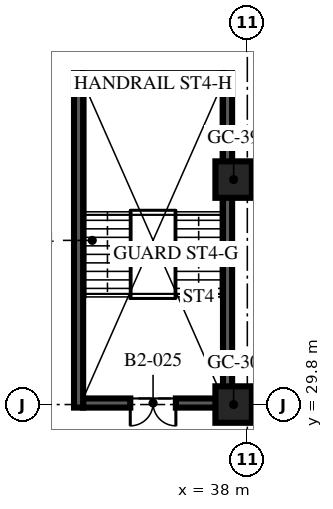
"""IFC4 building model, lengths in metres.
Left out: names, types, materials, properties, quantities, classifications, styles, units other than length and angle.
Written with IfcOpenShell. Run it as: python <this file> out.ifc"""

import sys

from ifc_helpers import new_model, si_unit, direction, frame, frame_2d, origin, origin_2d, place, context, subcontext, project, spatial, rectangle, extrude, element, fill, save


model = new_model("IFC4")
c1 = context("Model", 3, precision=1e-05, world=origin(), true_north=direction((0.0, 1.0)))
c2 = subcontext(c1, "Body", "Model", "MODEL_VIEW")
j1 = project(units=[si_unit("LENGTHUNIT", "METRE"), si_unit("PLANEANGLEUNIT", "RADIAN")], contexts=[c1])
p1 = place(None, origin())
s1 = spatial("IfcSite", under=j1, at=p1, CompositionType="ELEMENT")
p2 = place(p1, origin())
s2 = spatial("IfcBuilding", under=s1, at=p2, CompositionType="ELEMENT")
p3 = place(p2, frame((0.0, 0.0, -9.0)))
s3 = spatial("IfcBuildingStorey", under=s2, at=p3, CompositionType="ELEMENT", Elevation=-9.0)
for number, where, z_axis, x_axis in (
    (1, (37.55, 29.8, 0.0), (0.0, 0.0, 1.0), (1.0, 0.0, 0.0)),
    (2, (37.55, 37.2, 0.0), (0.0, 0.0, 1.0), (1.0, 0.0, 0.0)),
):
    element("IfcColumn", number, at=place(p3, frame(where, z_axis=z_axis, x_axis=x_axis)), inside=s3, PredefinedType="COLUMN", context=c2, shape_type="SweptSolid", body=[
        extrude(rectangle(XDim=1.2, YDim=1.2, at=origin_2d()), origin(), (0.0, 0.0, 1.0), 3.6),
    ])
p4 = place(p3, frame((37.35, 29.7, 0.0), z_axis=(0.0, 0.0, 1.0), x_axis=(0.0, 1.0, 0.0)))
e3 = element("IfcWall", 3, at=p4, inside=s3, PredefinedType="SOLIDWALL", context=c2, shape_type="SweptSolid", body=[
    extrude(rectangle(XDim=11.0, YDim=0.3, at=frame_2d((5.5, 0.0))), origin(), (0.0, 0.0, 1.0), 3.3),
])
p5 = place(p3, frame((37.2, 29.85, 0.0), z_axis=(0.0, 0.0, 1.0), x_axis=(-1.0, 0.0, 0.0)))
e4 = element("IfcWall", 4, at=p5, inside=s3, PredefinedType="SOLIDWALL", context=c2, shape_type="SweptSolid", body=[
    extrude(rectangle(XDim=4.6, YDim=0.3, at=frame_2d((2.3, 0.0))), origin(), (0.0, 0.0, 1.0), 3.3),
])
p6 = place(p5, frame((1.55, 0.0, 0.0)))
e5 = element("IfcOpeningElement", 5, at=p6, cuts=e4, PredefinedType="OPENING", context=c2, shape_type="SweptSolid", body=[
    extrude(rectangle(XDim=1.5, YDim=2.1, at=frame_2d((0.75, 1.05))), frame((0.0, 0.16, 0.0), z_axis=(0.0, -1.0, 0.0), x_axis=(1.0, 0.0, 0.0)), (0.0, 0.0, 1.0), 0.32),
])
p7 = place(p3, frame((32.45, 29.7, 0.0), z_axis=(0.0, 0.0, 1.0), x_axis=(0.0, 1.0, 0.0)))
e6 = element("IfcWall", 6, at=p7, inside=s3, PredefinedType="SOLIDWALL", context=c2, shape_type="SweptSolid", body=[
    extrude(rectangle(XDim=11.0, YDim=0.3, at=frame_2d((5.5, 0.0))), origin(), (0.0, 0.0, 1.0), 3.3),
])
p8 = place(p3, frame((37.2, 40.55, 0.0), z_axis=(0.0, 0.0, 1.0), x_axis=(-1.0, 0.0, 0.0)))
e7 = element("IfcWall", 7, at=p8, inside=s3, PredefinedType="SOLIDWALL", context=c2, shape_type="SweptSolid", body=[
    extrude(rectangle(XDim=4.6, YDim=0.3, at=frame_2d((2.3, 0.0))), origin(), (0.0, 0.0, 1.0), 3.3),
])
p9 = place(p6, origin())
e8 = element("IfcDoor", 8, at=p9, inside=s3, OperationType="DOUBLE_DOOR_SINGLE_SWING", PredefinedType="DOOR", context=c2, shape_type="SweptSolid", body=[
    extrude(rectangle(XDim=1.5, YDim=2.1, at=frame_2d((0.75, 1.05))), frame((0.0, 0.025, 0.0), z_axis=(0.0, -1.0, 0.0), x_axis=(1.0, 0.0, 0.0)), (0.0, 0.0, 1.0), 0.05),
])
fill(e5, e8)
save(model, sys.argv[1])
